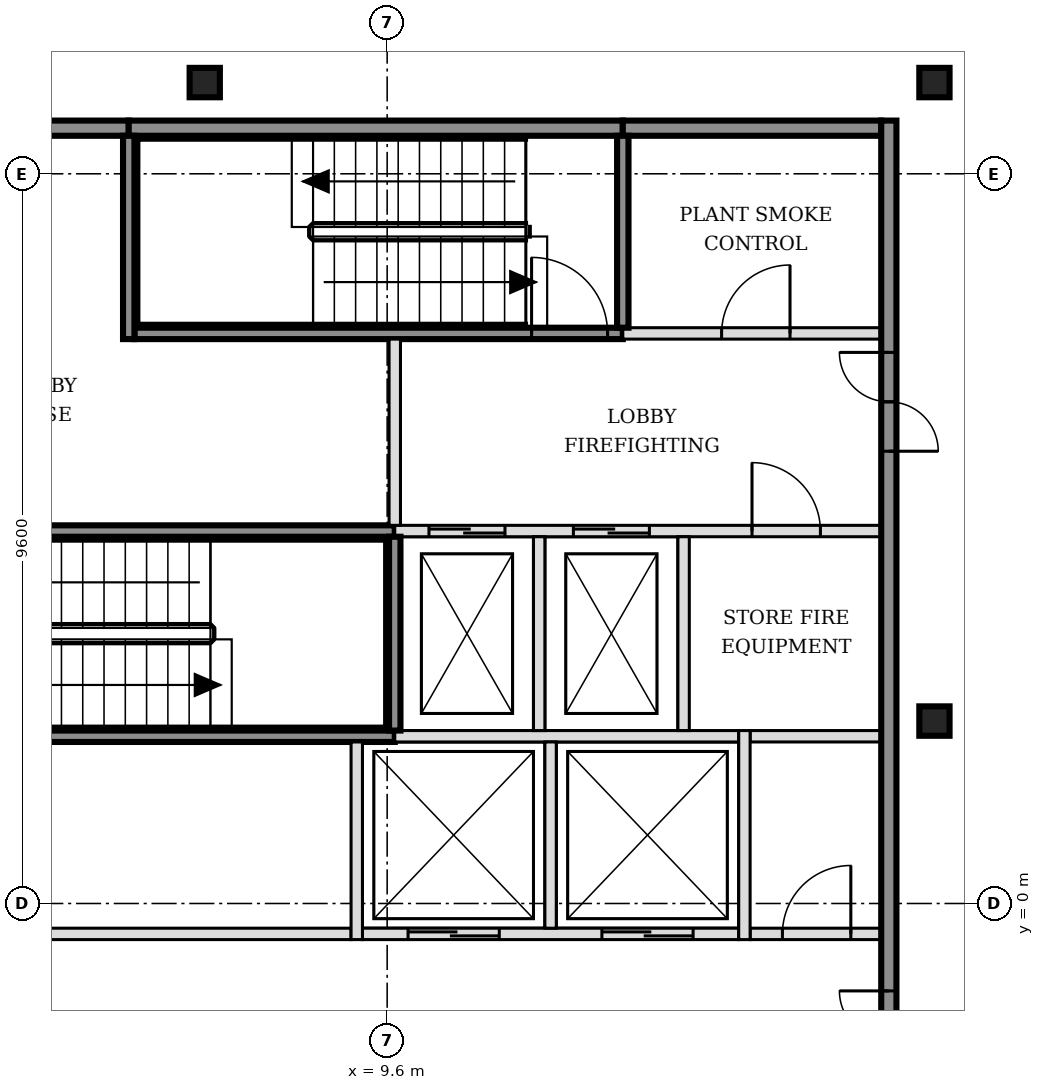
"""IFC4 building model, lengths in metres.
Left out: names, types, materials, properties, quantities, classifications, styles, units other than length and angle.
Written with IfcOpenShell. Run it as: python <this file> out.ifc"""

import sys

from ifc_helpers import new_model, si_unit, direction, frame, frame_2d, origin, origin_2d, place, context, subcontext, project, spatial, rectangle, i_section, extrude, element, fill, save


model = new_model("IFC4")
c1 = context("Model", 3, precision=1e-05, world=origin(), true_north=direction((0.0, 1.0)))
c2 = subcontext(c1, "Body", "Model", "MODEL_VIEW")
j1 = project(units=[si_unit("LENGTHUNIT", "METRE"), si_unit("PLANEANGLEUNIT", "RADIAN")], contexts=[c1])
p1 = place(None, origin())
s1 = spatial("IfcSite", under=j1, at=p1, CompositionType="ELEMENT")
p2 = place(p1, origin())
s2 = spatial("IfcBuilding", under=s1, at=p2, CompositionType="ELEMENT")
p3 = place(p2, frame((0.0, 0.0, 281.4)))
s3 = spatial("IfcBuildingStorey", under=s2, at=p3, CompositionType="ELEMENT", Elevation=281.4)
for number, where, z_axis, x_axis in (
    (1, (16.8, 2.4, -0.15), (0.0, 0.0, 1.0), (1.0, 0.0, 0.0)),
    (2, (7.2, 10.8, -0.15), (0.0, 0.0, 1.0), (1.0, 0.0, 0.0)),
    (3, (16.8, 10.8, -0.15), (0.0, 0.0, 1.0), (1.0, 0.0, 0.0)),
):
    element("IfcColumn", number, at=place(p3, frame(where, z_axis=z_axis, x_axis=x_axis)), inside=s3, PredefinedType="COLUMN", context=c2, shape_type="SweptSolid", body=[
        extrude(i_section(OverallWidth=0.398, OverallDepth=0.387, WebThickness=0.021, FlangeThickness=0.033, FilletRadius=0.015, at=origin_2d()), origin(), (0.0, 0.0, 1.0), 3.6),
    ])
p4 = place(p3, frame((-1.7, -0.4, 0.0), z_axis=(0.0, 0.0, 1.0), x_axis=(1.0, 0.0, 0.0)))
e4 = element("IfcWall", 4, at=p4, inside=s3, PredefinedType="PARTITIONING", context=c2, shape_type="SweptSolid", body=[
    extrude(rectangle(XDim=10.825, YDim=0.15, at=frame_2d((5.413, 0.0))), origin(), (0.0, 0.0, 1.0), 3.45),
])
p5 = place(p4, frame((4.95, 0.0, 0.0)))
e5 = element("IfcOpeningElement", 5, at=p5, cuts=e4, PredefinedType="OPENING", context=c2, shape_type="SweptSolid", body=[
    extrude(rectangle(XDim=0.9, YDim=2.1, at=frame_2d((0.45, 1.05))), frame((0.0, 0.085, 0.0), z_axis=(0.0, -1.0, 0.0), x_axis=(1.0, 0.0, 0.0)), (0.0, 0.0, 1.0), 0.17),
])
p6 = place(p3, frame((9.275, -0.4, 0.0), z_axis=(0.0, 0.0, 1.0), x_axis=(1.0, 0.0, 0.0)))
e6 = element("IfcWall", 6, at=p6, inside=s3, PredefinedType="SOLIDWALL", context=c2, shape_type="SweptSolid", body=[
    extrude(rectangle(XDim=4.95, YDim=0.15, at=frame_2d((2.475, 0.0))), origin(), (0.0, 0.0, 1.0), 3.45),
])
p7 = place(p6, frame((0.6, 0.0, 0.0)))
e7 = element("IfcOpeningElement", 7, at=p7, cuts=e6, PredefinedType="OPENING", context=c2, shape_type="SweptSolid", body=[
    extrude(rectangle(XDim=1.2, YDim=2.1, at=frame_2d((0.6, 1.05))), frame((0.0, 0.085, 0.0), z_axis=(0.0, -1.0, 0.0), x_axis=(1.0, 0.0, 0.0)), (0.0, 0.0, 1.0), 0.17),
])
p8 = place(p6, frame((3.15, 0.0, 0.0)))
e8 = element("IfcOpeningElement", 8, at=p8, cuts=e6, PredefinedType="OPENING", context=c2, shape_type="SweptSolid", body=[
    extrude(rectangle(XDim=1.2, YDim=2.1, at=frame_2d((0.6, 1.05))), frame((0.0, 0.085, 0.0), z_axis=(0.0, -1.0, 0.0), x_axis=(1.0, 0.0, 0.0)), (0.0, 0.0, 1.0), 0.17),
])
p9 = place(p3, frame((14.375, -0.4, 0.0), z_axis=(0.0, 0.0, 1.0), x_axis=(1.0, 0.0, 0.0)))
e9 = element("IfcWall", 9, at=p9, inside=s3, PredefinedType="PARTITIONING", context=c2, shape_type="SweptSolid", body=[
    extrude(rectangle(XDim=1.725, YDim=0.15, at=frame_2d((0.863, 0.0))), origin(), (0.0, 0.0, 1.0), 3.45),
])
p10 = place(p9, frame((0.425, 0.0, 0.0)))
e10 = element("IfcOpeningElement", 10, at=p10, cuts=e9, PredefinedType="OPENING", context=c2, shape_type="SweptSolid", body=[
    extrude(rectangle(XDim=0.9, YDim=2.1, at=frame_2d((0.45, 1.05))), frame((0.0, 0.085, 0.0), z_axis=(0.0, -1.0, 0.0), x_axis=(1.0, 0.0, 0.0)), (0.0, 0.0, 1.0), 0.17),
])
p11 = place(p3, frame((3.2, 2.2, 0.0), z_axis=(0.0, 0.0, 1.0), x_axis=(1.0, 0.0, 0.0)))
e11 = element("IfcWall", 11, at=p11, inside=s3, PredefinedType="SOLIDWALL", context=c2, shape_type="SweptSolid", body=[
    extrude(rectangle(XDim=6.5, YDim=0.15, at=frame_2d((3.25, 0.0))), origin(), (0.0, 0.0, 1.0), 3.45),
])
p12 = place(p3, frame((9.7, 2.2, 0.0), z_axis=(0.0, 0.0, 1.0), x_axis=(1.0, 0.0, 0.0)))
e12 = element("IfcWall", 12, at=p12, inside=s3, PredefinedType="SOLIDWALL", context=c2, shape_type="SweptSolid", body=[
    extrude(rectangle(XDim=4.525, YDim=0.15, at=frame_2d((2.263, 0.0))), origin(), (0.0, 0.0, 1.0), 3.45),
])
p13 = place(p3, frame((14.375, 2.2, 0.0), z_axis=(0.0, 0.0, 1.0), x_axis=(1.0, 0.0, 0.0)))
e13 = element("IfcWall", 13, at=p13, inside=s3, PredefinedType="PARTITIONING", context=c2, shape_type="SweptSolid", body=[
    extrude(rectangle(XDim=1.725, YDim=0.15, at=frame_2d((0.863, 0.0))), origin(), (0.0, 0.0, 1.0), 3.45),
])
p14 = place(p3, frame((3.2, 4.9, 0.0), z_axis=(0.0, 0.0, 1.0), x_axis=(1.0, 0.0, 0.0)))
e14 = element("IfcWall", 14, at=p14, inside=s3, PredefinedType="SOLIDWALL", context=c2, shape_type="SweptSolid", body=[
    extrude(rectangle(XDim=6.5, YDim=0.15, at=frame_2d((3.25, 0.0))), origin(), (0.0, 0.0, 1.0), 3.45),
])
p15 = place(p14, frame((0.175, 0.0, 0.0)))
e15 = element("IfcOpeningElement", 15, at=p15, cuts=e14, PredefinedType="OPENING", context=c2, shape_type="SweptSolid", body=[
    extrude(rectangle(XDim=1.0, YDim=2.1, at=frame_2d((0.5, 1.05))), frame((0.0, 0.085, 0.0), z_axis=(0.0, -1.0, 0.0), x_axis=(1.0, 0.0, 0.0)), (0.0, 0.0, 1.0), 0.17),
])
p16 = place(p3, frame((9.7, 4.9, 0.0), z_axis=(0.0, 0.0, 1.0), x_axis=(1.0, 0.0, 0.0)))
e16 = element("IfcWall", 16, at=p16, inside=s3, PredefinedType="SOLIDWALL", context=c2, shape_type="SweptSolid", body=[
    extrude(rectangle(XDim=6.4, YDim=0.15, at=frame_2d((3.2, 0.0))), origin(), (0.0, 0.0, 1.0), 3.45),
])
p17 = place(p16, frame((0.45, 0.0, 0.0)))
e17 = element("IfcOpeningElement", 17, at=p17, cuts=e16, PredefinedType="OPENING", context=c2, shape_type="SweptSolid", body=[
    extrude(rectangle(XDim=1.0, YDim=2.1, at=frame_2d((0.5, 1.05))), frame((0.0, 0.085, 0.0), z_axis=(0.0, -1.0, 0.0), x_axis=(1.0, 0.0, 0.0)), (0.0, 0.0, 1.0), 0.17),
])
p18 = place(p16, frame((2.35, 0.0, 0.0)))
e18 = element("IfcOpeningElement", 18, at=p18, cuts=e16, PredefinedType="OPENING", context=c2, shape_type="SweptSolid", body=[
    extrude(rectangle(XDim=1.0, YDim=2.1, at=frame_2d((0.5, 1.05))), frame((0.0, 0.085, 0.0), z_axis=(0.0, -1.0, 0.0), x_axis=(1.0, 0.0, 0.0)), (0.0, 0.0, 1.0), 0.17),
])
p19 = place(p16, frame((4.7, 0.0, 0.0)))
e19 = element("IfcOpeningElement", 19, at=p19, cuts=e16, PredefinedType="OPENING", context=c2, shape_type="SweptSolid", body=[
    extrude(rectangle(XDim=0.9, YDim=2.1, at=frame_2d((0.45, 1.05))), frame((0.0, 0.085, 0.0), z_axis=(0.0, -1.0, 0.0), x_axis=(1.0, 0.0, 0.0)), (0.0, 0.0, 1.0), 0.17),
])
p20 = place(p3, frame((6.275, 7.5, 0.0), z_axis=(0.0, 0.0, 1.0), x_axis=(1.0, 0.0, 0.0)))
e20 = element("IfcWall", 20, at=p20, inside=s3, PredefinedType="SOLIDWALL", context=c2, shape_type="SweptSolid", body=[
    extrude(rectangle(XDim=6.425, YDim=0.15, at=frame_2d((3.212, 0.0))), origin(), (0.0, 0.0, 1.0), 3.45),
])
p21 = place(p20, frame((5.225, 0.0, 0.0)))
e21 = element("IfcOpeningElement", 21, at=p21, cuts=e20, PredefinedType="OPENING", context=c2, shape_type="SweptSolid", body=[
    extrude(rectangle(XDim=1.0, YDim=2.1, at=frame_2d((0.5, 1.05))), frame((0.0, 0.085, 0.0), z_axis=(0.0, -1.0, 0.0), x_axis=(1.0, 0.0, 0.0)), (0.0, 0.0, 1.0), 0.17),
])
p22 = place(p3, frame((12.7, 7.5, 0.0), z_axis=(0.0, 0.0, 1.0), x_axis=(1.0, 0.0, 0.0)))
e22 = element("IfcWall", 22, at=p22, inside=s3, PredefinedType="SOLIDWALL", context=c2, shape_type="SweptSolid", body=[
    extrude(rectangle(XDim=3.4, YDim=0.15, at=frame_2d((1.7, 0.0))), origin(), (0.0, 0.0, 1.0), 3.45),
])
p23 = place(p22, frame((1.3, 0.0, 0.0)))
e23 = element("IfcOpeningElement", 23, at=p23, cuts=e22, PredefinedType="OPENING", context=c2, shape_type="SweptSolid", body=[
    extrude(rectangle(XDim=0.9, YDim=2.1, at=frame_2d((0.45, 1.05))), frame((0.0, 0.085, 0.0), z_axis=(0.0, -1.0, 0.0), x_axis=(1.0, 0.0, 0.0)), (0.0, 0.0, 1.0), 0.17),
])
p24 = place(p3, frame((-1.7, 10.2, 0.0), z_axis=(0.0, 0.0, 1.0), x_axis=(1.0, 0.0, 0.0)))
e24 = element("IfcWall", 24, at=p24, inside=s3, PredefinedType="SOLIDWALL", context=c2, shape_type="SweptSolid", body=[
    extrude(rectangle(XDim=7.9, YDim=0.2, at=frame_2d((3.95, 0.0))), origin(), (0.0, 0.0, 1.0), 3.45),
])
p25 = place(p3, frame((6.2, 10.2, 0.0), z_axis=(0.0, 0.0, 1.0), x_axis=(1.0, 0.0, 0.0)))
e25 = element("IfcWall", 25, at=p25, inside=s3, PredefinedType="SOLIDWALL", context=c2, shape_type="SweptSolid", body=[
    extrude(rectangle(XDim=6.5, YDim=0.2, at=frame_2d((3.25, 0.0))), origin(), (0.0, 0.0, 1.0), 3.45),
])
p26 = place(p3, frame((12.7, 10.2, 0.0), z_axis=(0.0, 0.0, 1.0), x_axis=(1.0, 0.0, 0.0)))
e26 = element("IfcWall", 26, at=p26, inside=s3, PredefinedType="SOLIDWALL", context=c2, shape_type="SweptSolid", body=[
    extrude(rectangle(XDim=3.4, YDim=0.2, at=frame_2d((1.7, 0.0))), origin(), (0.0, 0.0, 1.0), 3.45),
])
p27 = place(p3, frame((6.2, 7.425, 0.0), z_axis=(0.0, 0.0, 1.0), x_axis=(0.0, 1.0, 0.0)))
e27 = element("IfcWall", 27, at=p27, inside=s3, PredefinedType="SOLIDWALL", context=c2, shape_type="SweptSolid", body=[
    extrude(rectangle(XDim=2.675, YDim=0.15, at=frame_2d((1.337, 0.0))), origin(), (0.0, 0.0, 1.0), 3.45),
])
p28 = place(p3, frame((9.2, -0.475, 0.0), z_axis=(0.0, 0.0, 1.0), x_axis=(0.0, 1.0, 0.0)))
e28 = element("IfcWall", 28, at=p28, inside=s3, PredefinedType="SOLIDWALL", context=c2, shape_type="SweptSolid", body=[
    extrude(rectangle(XDim=2.6, YDim=0.15, at=frame_2d((1.3, 0.0))), origin(), (0.0, 0.0, 1.0), 3.45),
])
p29 = place(p3, frame((9.7, 2.275, 0.0), z_axis=(0.0, 0.0, 1.0), x_axis=(0.0, 1.0, 0.0)))
e29 = element("IfcWall", 29, at=p29, inside=s3, PredefinedType="SOLIDWALL", context=c2, shape_type="SweptSolid", body=[
    extrude(rectangle(XDim=2.55, YDim=0.15, at=frame_2d((1.275, 0.0))), origin(), (0.0, 0.0, 1.0), 3.45),
])
p30 = place(p3, frame((9.7, 4.975, 0.0), z_axis=(0.0, 0.0, 1.0), x_axis=(0.0, 1.0, 0.0)))
e30 = element("IfcWall", 30, at=p30, inside=s3, PredefinedType="SOLIDWALL", context=c2, shape_type="SweptSolid", body=[
    extrude(rectangle(XDim=2.45, YDim=0.15, at=frame_2d((1.225, 0.0))), origin(), (0.0, 0.0, 1.0), 3.45),
])
p31 = place(p3, frame((11.6, 2.275, 0.0), z_axis=(0.0, 0.0, 1.0), x_axis=(0.0, 1.0, 0.0)))
e31 = element("IfcWall", 31, at=p31, inside=s3, PredefinedType="SOLIDWALL", context=c2, shape_type="SweptSolid", body=[
    extrude(rectangle(XDim=2.55, YDim=0.15, at=frame_2d((1.275, 0.0))), origin(), (0.0, 0.0, 1.0), 3.45),
])
p32 = place(p3, frame((11.75, -0.325, 0.0), z_axis=(0.0, 0.0, 1.0), x_axis=(0.0, 1.0, 0.0)))
e32 = element("IfcWall", 32, at=p32, inside=s3, PredefinedType="SOLIDWALL", context=c2, shape_type="SweptSolid", body=[
    extrude(rectangle(XDim=2.45, YDim=0.15, at=frame_2d((1.225, 0.0))), origin(), (0.0, 0.0, 1.0), 3.45),
])
p33 = place(p3, frame((12.7, 7.575, 0.0), z_axis=(0.0, 0.0, 1.0), x_axis=(0.0, 1.0, 0.0)))
e33 = element("IfcWall", 33, at=p33, inside=s3, PredefinedType="SOLIDWALL", context=c2, shape_type="SweptSolid", body=[
    extrude(rectangle(XDim=2.525, YDim=0.15, at=frame_2d((1.263, 0.0))), origin(), (0.0, 0.0, 1.0), 3.45),
])
p34 = place(p3, frame((13.5, 2.275, 0.0), z_axis=(0.0, 0.0, 1.0), x_axis=(0.0, 1.0, 0.0)))
e34 = element("IfcWall", 34, at=p34, inside=s3, PredefinedType="SOLIDWALL", context=c2, shape_type="SweptSolid", body=[
    extrude(rectangle(XDim=2.55, YDim=0.15, at=frame_2d((1.275, 0.0))), origin(), (0.0, 0.0, 1.0), 3.45),
])
p35 = place(p3, frame((14.3, -0.475, 0.0), z_axis=(0.0, 0.0, 1.0), x_axis=(0.0, 1.0, 0.0)))
e35 = element("IfcWall", 35, at=p35, inside=s3, PredefinedType="SOLIDWALL", context=c2, shape_type="SweptSolid", body=[
    extrude(rectangle(XDim=2.75, YDim=0.15, at=frame_2d((1.375, 0.0))), origin(), (0.0, 0.0, 1.0), 3.45),
])
p36 = place(p3, frame((16.2, -5.5, 0.0), z_axis=(0.0, 0.0, 1.0), x_axis=(0.0, 1.0, 0.0)))
e36 = element("IfcWall", 36, at=p36, inside=s3, PredefinedType="SOLIDWALL", context=c2, shape_type="SweptSolid", body=[
    extrude(rectangle(XDim=15.8, YDim=0.2, at=frame_2d((7.9, 0.0))), origin(), (0.0, 0.0, 1.0), 3.45),
])
p37 = place(p36, frame((3.05, 0.0, 0.0)))
e37 = element("IfcOpeningElement", 37, at=p37, cuts=e36, PredefinedType="OPENING", context=c2, shape_type="SweptSolid", body=[
    extrude(rectangle(XDim=1.3, YDim=2.1, at=frame_2d((0.65, 1.05))), frame((0.0, 0.11, 0.0), z_axis=(0.0, -1.0, 0.0), x_axis=(1.0, 0.0, 0.0)), (0.0, 0.0, 1.0), 0.22),
])
p38 = place(p36, frame((11.45, 0.0, 0.0)))
e38 = element("IfcOpeningElement", 38, at=p38, cuts=e36, PredefinedType="OPENING", context=c2, shape_type="SweptSolid", body=[
    extrude(rectangle(XDim=1.3, YDim=2.1, at=frame_2d((0.65, 1.05))), frame((0.0, 0.11, 0.0), z_axis=(0.0, -1.0, 0.0), x_axis=(1.0, 0.0, 0.0)), (0.0, 0.0, 1.0), 0.22),
])
p39 = place(p3, frame((14.322, -16.672, 0.0), z_axis=(0.0, 0.0, 1.0), x_axis=(0.707106781187, 0.707106781187, 0.0)))
e39 = element("IfcWall", 39, at=p39, inside=s3, PredefinedType="PARTITIONING", context=c2, shape_type="SweptSolid", body=[
    extrude(rectangle(XDim=23.452, YDim=0.15, at=frame_2d((11.726, 0.0))), origin(), (0.0, 0.0, 1.0), 2.73),
])
p40 = place(p39, frame((0.775, 0.0, 0.0)))
e40 = element("IfcOpeningElement", 40, at=p40, cuts=e39, PredefinedType="OPENING", context=c2, shape_type="SweptSolid", body=[
    extrude(rectangle(XDim=0.9, YDim=2.1, at=frame_2d((0.45, 1.05))), frame((0.0, 0.085, 0.0), z_axis=(0.0, -1.0, 0.0), x_axis=(1.0, 0.0, 0.0)), (0.0, 0.0, 1.0), 0.17),
])
p41 = place(p39, frame((6.489, 0.0, 0.0)))
e41 = element("IfcOpeningElement", 41, at=p41, cuts=e39, PredefinedType="OPENING", context=c2, shape_type="SweptSolid", body=[
    extrude(rectangle(XDim=0.9, YDim=2.1, at=frame_2d((0.45, 1.05))), frame((0.0, 0.085, 0.0), z_axis=(0.0, -1.0, 0.0), x_axis=(1.0, 0.0, 0.0)), (0.0, 0.0, 1.0), 0.17),
])
p42 = place(p39, frame((10.89, 0.0, 0.0)))
e42 = element("IfcOpeningElement", 42, at=p42, cuts=e39, PredefinedType="OPENING", context=c2, shape_type="SweptSolid", body=[
    extrude(rectangle(XDim=0.9, YDim=2.1, at=frame_2d((0.45, 1.05))), frame((0.0, 0.085, 0.0), z_axis=(0.0, -1.0, 0.0), x_axis=(1.0, 0.0, 0.0)), (0.0, 0.0, 1.0), 0.17),
])
p43 = place(p39, frame((14.788, 0.0, 0.0)))
e43 = element("IfcOpeningElement", 43, at=p43, cuts=e39, PredefinedType="OPENING", context=c2, shape_type="SweptSolid", body=[
    extrude(rectangle(XDim=0.9, YDim=2.1, at=frame_2d((0.45, 1.05))), frame((0.0, 0.085, 0.0), z_axis=(0.0, -1.0, 0.0), x_axis=(1.0, 0.0, 0.0)), (0.0, 0.0, 1.0), 0.17),
])
p44 = place(p39, frame((17.689, 0.0, 0.0)))
e44 = element("IfcOpeningElement", 44, at=p44, cuts=e39, PredefinedType="OPENING", context=c2, shape_type="SweptSolid", body=[
    extrude(rectangle(XDim=0.9, YDim=2.1, at=frame_2d((0.45, 1.05))), frame((0.0, 0.085, 0.0), z_axis=(0.0, -1.0, 0.0), x_axis=(1.0, 0.0, 0.0)), (0.0, 0.0, 1.0), 0.17),
])
p45 = place(p7, origin())
e45 = element("IfcDoor", 45, at=p45, inside=s3, OperationType="DOUBLE_DOOR_SLIDING", PredefinedType="DOOR", context=c2, shape_type="SweptSolid", body=[
    extrude(rectangle(XDim=1.2, YDim=2.1, at=frame_2d((0.6, 1.05))), frame((0.0, 0.025, 0.0), z_axis=(0.0, -1.0, 0.0), x_axis=(1.0, 0.0, 0.0)), (0.0, 0.0, 1.0), 0.05),
])
fill(e7, e45)
p46 = place(p8, origin())
e46 = element("IfcDoor", 46, at=p46, inside=s3, OperationType="DOUBLE_DOOR_SLIDING", PredefinedType="DOOR", context=c2, shape_type="SweptSolid", body=[
    extrude(rectangle(XDim=1.2, YDim=2.1, at=frame_2d((0.6, 1.05))), frame((0.0, 0.025, 0.0), z_axis=(0.0, -1.0, 0.0), x_axis=(1.0, 0.0, 0.0)), (0.0, 0.0, 1.0), 0.05),
])
fill(e8, e46)
p47 = place(p17, origin())
e47 = element("IfcDoor", 47, at=p47, inside=s3, OperationType="DOUBLE_DOOR_SLIDING", PredefinedType="DOOR", context=c2, shape_type="SweptSolid", body=[
    extrude(rectangle(XDim=1.0, YDim=2.1, at=frame_2d((0.5, 1.05))), frame((0.0, 0.025, 0.0), z_axis=(0.0, -1.0, 0.0), x_axis=(1.0, 0.0, 0.0)), (0.0, 0.0, 1.0), 0.05),
])
fill(e17, e47)
p48 = place(p18, origin())
e48 = element("IfcDoor", 48, at=p48, inside=s3, OperationType="DOUBLE_DOOR_SLIDING", PredefinedType="DOOR", context=c2, shape_type="SweptSolid", body=[
    extrude(rectangle(XDim=1.0, YDim=2.1, at=frame_2d((0.5, 1.05))), frame((0.0, 0.025, 0.0), z_axis=(0.0, -1.0, 0.0), x_axis=(1.0, 0.0, 0.0)), (0.0, 0.0, 1.0), 0.05),
])
fill(e18, e48)
p49 = place(p21, origin())
e49 = element("IfcDoor", 49, at=p49, inside=s3, OperationType="SINGLE_SWING_LEFT", PredefinedType="DOOR", context=c2, shape_type="SweptSolid", body=[
    extrude(rectangle(XDim=1.0, YDim=2.1, at=frame_2d((0.5, 1.05))), frame((0.0, 0.025, 0.0), z_axis=(0.0, -1.0, 0.0), x_axis=(1.0, 0.0, 0.0)), (0.0, 0.0, 1.0), 0.05),
])
fill(e21, e49)
p50 = place(p37, origin())
e50 = element("IfcDoor", 50, at=p50, inside=s3, OperationType="DOUBLE_DOOR_SINGLE_SWING", PredefinedType="DOOR", context=c2, shape_type="SweptSolid", body=[
    extrude(rectangle(XDim=1.3, YDim=2.1, at=frame_2d((0.65, 1.05))), frame((0.0, 0.025, 0.0), z_axis=(0.0, -1.0, 0.0), x_axis=(1.0, 0.0, 0.0)), (0.0, 0.0, 1.0), 0.05),
])
fill(e37, e50)
p51 = place(p38, origin())
e51 = element("IfcDoor", 51, at=p51, inside=s3, OperationType="DOUBLE_DOOR_SINGLE_SWING", PredefinedType="DOOR", context=c2, shape_type="SweptSolid", body=[
    extrude(rectangle(XDim=1.3, YDim=2.1, at=frame_2d((0.65, 1.05))), frame((0.0, 0.025, 0.0), z_axis=(0.0, -1.0, 0.0), x_axis=(1.0, 0.0, 0.0)), (0.0, 0.0, 1.0), 0.05),
])
fill(e38, e51)
p52 = place(p10, origin())
e52 = element("IfcDoor", 52, at=p52, inside=s3, OperationType="SINGLE_SWING_RIGHT", PredefinedType="DOOR", context=c2, shape_type="SweptSolid", body=[
    extrude(rectangle(XDim=0.9, YDim=2.1, at=frame_2d((0.45, 1.05))), frame((0.0, 0.025, 0.0), z_axis=(0.0, -1.0, 0.0), x_axis=(1.0, 0.0, 0.0)), (0.0, 0.0, 1.0), 0.05),
])
fill(e10, e52)
p53 = place(p19, origin())
e53 = element("IfcDoor", 53, at=p53, inside=s3, OperationType="SINGLE_SWING_LEFT", PredefinedType="DOOR", context=c2, shape_type="SweptSolid", body=[
    extrude(rectangle(XDim=0.9, YDim=2.1, at=frame_2d((0.45, 1.05))), frame((0.0, 0.025, 0.0), z_axis=(0.0, -1.0, 0.0), x_axis=(1.0, 0.0, 0.0)), (0.0, 0.0, 1.0), 0.05),
])
fill(e19, e53)
p54 = place(p23, origin())
e54 = element("IfcDoor", 54, at=p54, inside=s3, OperationType="SINGLE_SWING_RIGHT", PredefinedType="DOOR", context=c2, shape_type="SweptSolid", body=[
    extrude(rectangle(XDim=0.9, YDim=2.1, at=frame_2d((0.45, 1.05))), frame((0.0, 0.025, 0.0), z_axis=(0.0, -1.0, 0.0), x_axis=(1.0, 0.0, 0.0)), (0.0, 0.0, 1.0), 0.05),
])
fill(e23, e54)
save(model, sys.argv[1])
